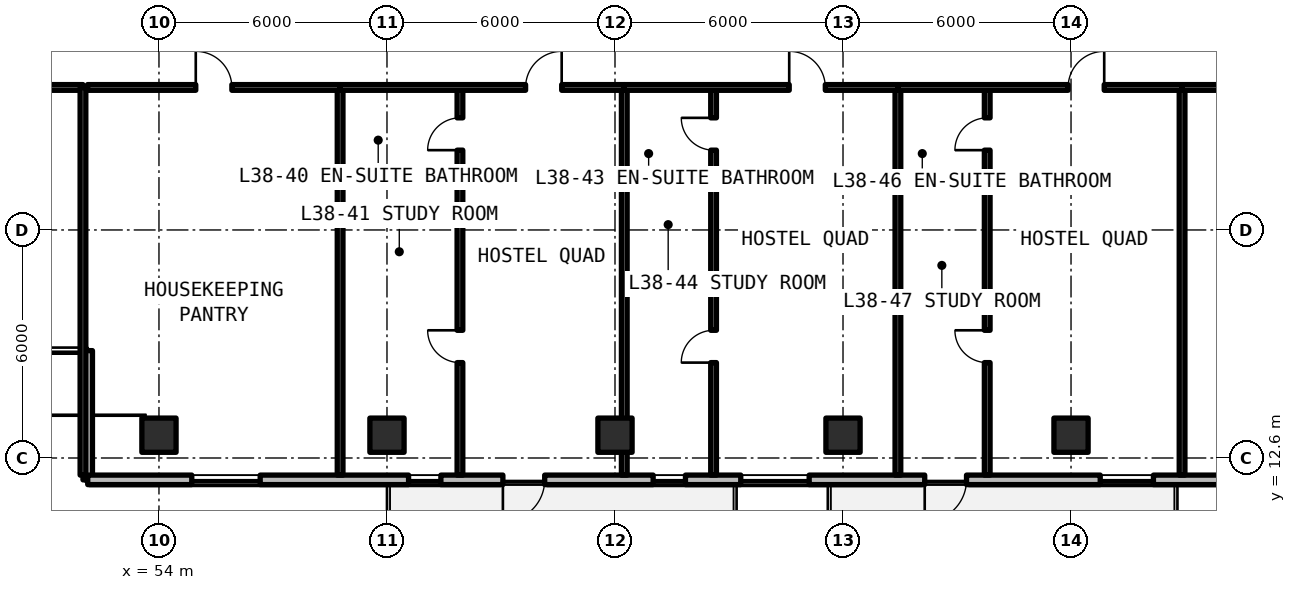
"""IFC4 building model, lengths in metres.
Left out: names, types, materials, properties, quantities, classifications, styles, units other than length and angle.
Written with IfcOpenShell. Run it as: python <this file> out.ifc"""

import sys

from ifc_helpers import new_model, si_unit, direction, frame, frame_2d, origin, origin_2d, place, context, subcontext, project, spatial, rectangle, extrude, element, fill, save


model = new_model("IFC4")
c1 = context("Model", 3, precision=1e-05, world=origin(), true_north=direction((0.0, 1.0)))
c2 = subcontext(c1, "Body", "Model", "MODEL_VIEW")
j1 = project(units=[si_unit("LENGTHUNIT", "METRE"), si_unit("PLANEANGLEUNIT", "RADIAN")], contexts=[c1])
p1 = place(None, origin())
s1 = spatial("IfcSite", under=j1, at=p1, CompositionType="ELEMENT")
p2 = place(p1, origin())
s2 = spatial("IfcBuilding", under=s1, at=p2, CompositionType="ELEMENT")
p3 = place(p2, frame((0.0, 0.0, 138.6)))
s3 = spatial("IfcBuildingStorey", under=s2, at=p3, CompositionType="ELEMENT", Elevation=138.6)
for number, where, z_axis, x_axis in (
    (1, (54.0, 13.2, 0.0), (0.0, 0.0, 1.0), (1.0, 0.0, 0.0)),
    (2, (60.0, 13.2, 0.0), (0.0, 0.0, 1.0), (1.0, 0.0, 0.0)),
    (3, (66.0, 13.2, 0.0), (0.0, 0.0, 1.0), (1.0, 0.0, 0.0)),
    (4, (72.0, 13.2, 0.0), (0.0, 0.0, 1.0), (1.0, 0.0, 0.0)),
    (5, (78.0, 13.2, 0.0), (0.0, 0.0, 1.0), (1.0, 0.0, 0.0)),
):
    element("IfcColumn", number, at=place(p3, frame(where, z_axis=z_axis, x_axis=x_axis)), inside=s3, PredefinedType="COLUMN", context=c2, shape_type="SweptSolid", body=[
        extrude(rectangle(XDim=0.9, YDim=0.9, at=origin_2d()), origin(), (0.0, 0.0, 1.0), 3.3),
    ])
p4 = place(p3, frame((52.125, 15.425, 0.0), z_axis=(0.0, 0.0, 1.0), x_axis=(0.0, -1.0, 0.0)))
e6 = element("IfcWall", 6, at=p4, inside=s3, PredefinedType="SOLIDWALL", context=c2, shape_type="SweptSolid", body=[
    extrude(rectangle(XDim=3.4, YDim=0.25, at=frame_2d((1.7, 0.0))), origin(), (0.0, 0.0, 1.0), 3.08),
])
p5 = place(p3, frame((52.125, 12.025, 0.0), z_axis=(0.0, 0.0, 1.0), x_axis=(1.0, 0.0, 0.0)))
e7 = element("IfcWall", 7, at=p5, inside=s3, PredefinedType="SOLIDWALL", context=c2, shape_type="SweptSolid", body=[
    extrude(rectangle(XDim=43.623, YDim=0.25, at=frame_2d((21.812, 0.0))), origin(), (0.0, 0.0, 1.0), 3.08),
])
p6 = place(p5, frame((10.925, 0.0, 0.0)))
e8 = element("IfcOpeningElement", 8, at=p6, cuts=e7, PredefinedType="OPENING", context=c2, shape_type="SweptSolid", body=[
    extrude(rectangle(XDim=1.1, YDim=2.15, at=frame_2d((0.55, 1.075))), frame((0.0, 0.135, 0.0), z_axis=(0.0, -1.0, 0.0), x_axis=(1.0, 0.0, 0.0)), (0.0, 0.0, 1.0), 0.27),
])
p7 = place(p5, frame((22.025, 0.0, 0.0)))
e9 = element("IfcOpeningElement", 9, at=p7, cuts=e7, PredefinedType="OPENING", context=c2, shape_type="SweptSolid", body=[
    extrude(rectangle(XDim=1.1, YDim=2.15, at=frame_2d((0.55, 1.075))), frame((0.0, 0.135, 0.0), z_axis=(0.0, -1.0, 0.0), x_axis=(1.0, 0.0, 0.0)), (0.0, 0.0, 1.0), 0.27),
])
p8 = place(p5, frame((2.738, 0.0, 0.78)))
e10 = element("IfcOpeningElement", 10, at=p8, cuts=e7, PredefinedType="OPENING", context=c2, shape_type="SweptSolid", body=[
    extrude(rectangle(XDim=1.8, YDim=1.66, at=frame_2d((0.9, 0.83))), frame((0.0, 0.135, 0.0), z_axis=(0.0, -1.0, 0.0), x_axis=(1.0, 0.0, 0.0)), (0.0, 0.0, 1.0), 0.27),
])
p9 = place(p5, frame((8.443, 0.0, 0.78)))
e11 = element("IfcOpeningElement", 11, at=p9, cuts=e7, PredefinedType="OPENING", context=c2, shape_type="SweptSolid", body=[
    extrude(rectangle(XDim=0.85, YDim=1.65, at=frame_2d((0.425, 0.825))), frame((0.0, 0.135, 0.0), z_axis=(0.0, -1.0, 0.0), x_axis=(1.0, 0.0, 0.0)), (0.0, 0.0, 1.0), 0.27),
])
p10 = place(p5, frame((14.879, 0.0, 0.78)))
e12 = element("IfcOpeningElement", 12, at=p10, cuts=e7, PredefinedType="OPENING", context=c2, shape_type="SweptSolid", body=[
    extrude(rectangle(XDim=0.85, YDim=1.65, at=frame_2d((0.425, 0.825))), frame((0.0, 0.135, 0.0), z_axis=(0.0, -1.0, 0.0), x_axis=(1.0, 0.0, 0.0)), (0.0, 0.0, 1.0), 0.27),
])
p11 = place(p5, frame((17.184, 0.0, 0.78)))
e13 = element("IfcOpeningElement", 13, at=p11, cuts=e7, PredefinedType="OPENING", context=c2, shape_type="SweptSolid", body=[
    extrude(rectangle(XDim=1.8, YDim=1.66, at=frame_2d((0.9, 0.83))), frame((0.0, 0.135, 0.0), z_axis=(0.0, -1.0, 0.0), x_axis=(1.0, 0.0, 0.0)), (0.0, 0.0, 1.0), 0.27),
])
p12 = place(p5, frame((26.643, 0.0, 0.78)))
e14 = element("IfcOpeningElement", 14, at=p12, cuts=e7, PredefinedType="OPENING", context=c2, shape_type="SweptSolid", body=[
    extrude(rectangle(XDim=1.4, YDim=1.65, at=frame_2d((0.7, 0.825))), frame((0.0, 0.135, 0.0), z_axis=(0.0, -1.0, 0.0), x_axis=(1.0, 0.0, 0.0)), (0.0, 0.0, 1.0), 0.27),
])
p13 = place(p5, frame((32.777, 0.0, 0.78)))
e15 = element("IfcOpeningElement", 15, at=p13, cuts=e7, PredefinedType="OPENING", context=c2, shape_type="SweptSolid", body=[
    extrude(rectangle(XDim=1.8, YDim=1.66, at=frame_2d((0.9, 0.83))), frame((0.0, 0.135, 0.0), z_axis=(0.0, -1.0, 0.0), x_axis=(1.0, 0.0, 0.0)), (0.0, 0.0, 1.0), 0.27),
])
p14 = place(p5, frame((38.836, 0.0, 0.78)))
e16 = element("IfcOpeningElement", 16, at=p14, cuts=e7, PredefinedType="OPENING", context=c2, shape_type="SweptSolid", body=[
    extrude(rectangle(XDim=1.8, YDim=1.66, at=frame_2d((0.9, 0.83))), frame((0.0, 0.135, 0.0), z_axis=(0.0, -1.0, 0.0), x_axis=(1.0, 0.0, 0.0)), (0.0, 0.0, 1.0), 0.27),
])
p15 = place(p3, frame((43.6, 22.35, 0.0), z_axis=(0.0, 0.0, 1.0), x_axis=(1.0, 0.0, 0.0)))
e17 = element("IfcWall", 17, at=p15, inside=s3, PredefinedType="SOLIDWALL", context=c2, shape_type="SweptSolid", body=[
    extrude(rectangle(XDim=8.4, YDim=0.15, at=frame_2d((4.2, 0.0))), origin(), (0.0, 0.0, 1.0), 2.35),
])
p16 = place(p15, frame((3.65, 0.0, 0.0)))
e18 = element("IfcOpeningElement", 18, at=p16, cuts=e17, PredefinedType="OPENING", context=c2, shape_type="SweptSolid", body=[
    extrude(rectangle(XDim=1.1, YDim=2.15, at=frame_2d((0.55, 1.075))), frame((0.0, 0.085, 0.0), z_axis=(0.0, -1.0, 0.0), x_axis=(1.0, 0.0, 0.0)), (0.0, 0.0, 1.0), 0.17),
])
for number, where, z_axis, x_axis in (
    (19, (52.0, 12.15, 0.0), (0.0, 0.0, 1.0), (0.0, 1.0, 0.0)),
    (20, (58.767, 12.15, 0.0), (0.0, 0.0, 1.0), (0.0, 1.0, 0.0)),
):
    element("IfcWall", number, at=place(p3, frame(where, z_axis=z_axis, x_axis=x_axis)), inside=s3, PredefinedType="SOLIDWALL", context=c2, shape_type="SweptSolid", body=[
        extrude(rectangle(XDim=10.2, YDim=0.15, at=frame_2d((5.1, 0.0))), origin(), (0.0, 0.0, 1.0), 2.35),
    ])
p17 = place(p3, frame((52.12, 22.35, 0.0), z_axis=(0.0, 0.0, 1.0), x_axis=(1.0, 0.0, 0.0)))
e21 = element("IfcWall", 21, at=p17, inside=s3, PredefinedType="SOLIDWALL", context=c2, shape_type="SweptSolid", body=[
    extrude(rectangle(XDim=6.646, YDim=0.15, at=frame_2d((3.323, 0.0))), origin(), (0.0, 0.0, 1.0), 2.35),
])
p18 = place(p17, frame((2.848, 0.0, 0.0)))
e22 = element("IfcOpeningElement", 22, at=p18, cuts=e21, PredefinedType="OPENING", context=c2, shape_type="SweptSolid", body=[
    extrude(rectangle(XDim=0.95, YDim=2.15, at=frame_2d((0.475, 1.075))), frame((0.0, 0.085, 0.0), z_axis=(0.0, -1.0, 0.0), x_axis=(1.0, 0.0, 0.0)), (0.0, 0.0, 1.0), 0.17),
])
p19 = place(p3, frame((66.244, 12.15, 0.0), z_axis=(0.0, 0.0, 1.0), x_axis=(0.0, 1.0, 0.0)))
e23 = element("IfcWall", 23, at=p19, inside=s3, PredefinedType="SOLIDWALL", context=c2, shape_type="SweptSolid", body=[
    extrude(rectangle(XDim=10.2, YDim=0.15, at=frame_2d((5.1, 0.0))), origin(), (0.0, 0.0, 1.0), 2.35),
])
p20 = place(p3, frame((58.767, 19.9, 0.0), z_axis=(0.0, 0.0, 1.0), x_axis=(1.0, 0.0, 0.0)))
e24 = element("IfcWall", 24, at=p20, inside=s3, PredefinedType="PARTITIONING", context=c2, shape_type="SweptSolid", body=[
    extrude(rectangle(XDim=3.153, YDim=0.15, at=frame_2d((1.577, 0.0))), origin(), (0.0, 0.0, 1.0), 2.35),
])
p21 = place(p3, frame((61.92, 12.15, 0.0), z_axis=(0.0, 0.0, 1.0), x_axis=(0.0, 1.0, 0.0)))
e25 = element("IfcWall", 25, at=p21, inside=s3, PredefinedType="PARTITIONING", context=c2, shape_type="SweptSolid", body=[
    extrude(rectangle(XDim=10.2, YDim=0.15, at=frame_2d((5.1, 0.0))), origin(), (0.0, 0.0, 1.0), 2.35),
])
p22 = place(p21, frame((2.96, 0.0, 0.0)))
e26 = element("IfcOpeningElement", 26, at=p22, cuts=e25, PredefinedType="OPENING", context=c2, shape_type="SweptSolid", body=[
    extrude(rectangle(XDim=0.85, YDim=2.1, at=frame_2d((0.425, 1.05))), frame((0.0, 0.085, 0.0), z_axis=(0.0, -1.0, 0.0), x_axis=(1.0, 0.0, 0.0)), (0.0, 0.0, 1.0), 0.17),
])
p23 = place(p21, frame((8.55, 0.0, 0.0)))
e27 = element("IfcOpeningElement", 27, at=p23, cuts=e25, PredefinedType="OPENING", context=c2, shape_type="SweptSolid", body=[
    extrude(rectangle(XDim=0.85, YDim=2.1, at=frame_2d((0.425, 1.05))), frame((0.0, 0.085, 0.0), z_axis=(0.0, -1.0, 0.0), x_axis=(1.0, 0.0, 0.0)), (0.0, 0.0, 1.0), 0.17),
])
p24 = place(p3, frame((58.767, 22.35, 0.0), z_axis=(0.0, 0.0, 1.0), x_axis=(1.0, 0.0, 0.0)))
e28 = element("IfcWall", 28, at=p24, inside=s3, PredefinedType="SOLIDWALL", context=c2, shape_type="SweptSolid", body=[
    extrude(rectangle(XDim=7.478, YDim=0.15, at=frame_2d((3.739, 0.0))), origin(), (0.0, 0.0, 1.0), 2.35),
])
p25 = place(p24, frame((4.881, 0.0, 0.0)))
e29 = element("IfcOpeningElement", 29, at=p25, cuts=e28, PredefinedType="OPENING", context=c2, shape_type="SweptSolid", body=[
    extrude(rectangle(XDim=0.95, YDim=2.15, at=frame_2d((0.475, 1.075))), frame((0.0, 0.085, 0.0), z_axis=(0.0, -1.0, 0.0), x_axis=(1.0, 0.0, 0.0)), (0.0, 0.0, 1.0), 0.17),
])
p26 = place(p3, frame((73.445, 12.15, 0.0), z_axis=(0.0, 0.0, 1.0), x_axis=(0.0, 1.0, 0.0)))
e30 = element("IfcWall", 30, at=p26, inside=s3, PredefinedType="SOLIDWALL", context=c2, shape_type="SweptSolid", body=[
    extrude(rectangle(XDim=10.2, YDim=0.15, at=frame_2d((5.1, 0.0))), origin(), (0.0, 0.0, 1.0), 2.35),
])
p27 = place(p3, frame((66.244, 19.9, 0.0), z_axis=(0.0, 0.0, 1.0), x_axis=(1.0, 0.0, 0.0)))
e31 = element("IfcWall", 31, at=p27, inside=s3, PredefinedType="PARTITIONING", context=c2, shape_type="SweptSolid", body=[
    extrude(rectangle(XDim=2.35, YDim=0.15, at=frame_2d((1.175, 0.0))), origin(), (0.0, 0.0, 1.0), 2.35),
])
p28 = place(p3, frame((68.594, 12.15, 0.0), z_axis=(0.0, 0.0, 1.0), x_axis=(0.0, 1.0, 0.0)))
e32 = element("IfcWall", 32, at=p28, inside=s3, PredefinedType="PARTITIONING", context=c2, shape_type="SweptSolid", body=[
    extrude(rectangle(XDim=10.2, YDim=0.15, at=frame_2d((5.1, 0.0))), origin(), (0.0, 0.0, 1.0), 2.35),
])
p29 = place(p28, frame((2.96, 0.0, 0.0)))
e33 = element("IfcOpeningElement", 33, at=p29, cuts=e32, PredefinedType="OPENING", context=c2, shape_type="SweptSolid", body=[
    extrude(rectangle(XDim=0.85, YDim=2.1, at=frame_2d((0.425, 1.05))), frame((0.0, 0.085, 0.0), z_axis=(0.0, -1.0, 0.0), x_axis=(1.0, 0.0, 0.0)), (0.0, 0.0, 1.0), 0.17),
])
p30 = place(p28, frame((8.55, 0.0, 0.0)))
e34 = element("IfcOpeningElement", 34, at=p30, cuts=e32, PredefinedType="OPENING", context=c2, shape_type="SweptSolid", body=[
    extrude(rectangle(XDim=0.85, YDim=2.1, at=frame_2d((0.425, 1.05))), frame((0.0, 0.085, 0.0), z_axis=(0.0, -1.0, 0.0), x_axis=(1.0, 0.0, 0.0)), (0.0, 0.0, 1.0), 0.17),
])
p31 = place(p3, frame((66.244, 22.35, 0.0), z_axis=(0.0, 0.0, 1.0), x_axis=(1.0, 0.0, 0.0)))
e35 = element("IfcWall", 35, at=p31, inside=s3, PredefinedType="SOLIDWALL", context=c2, shape_type="SweptSolid", body=[
    extrude(rectangle(XDim=7.2, YDim=0.15, at=frame_2d((3.6, 0.0))), origin(), (0.0, 0.0, 1.0), 2.35),
])
p32 = place(p31, frame((4.34, 0.0, 0.0)))
e36 = element("IfcOpeningElement", 36, at=p32, cuts=e35, PredefinedType="OPENING", context=c2, shape_type="SweptSolid", body=[
    extrude(rectangle(XDim=0.95, YDim=2.15, at=frame_2d((0.475, 1.075))), frame((0.0, 0.085, 0.0), z_axis=(0.0, -1.0, 0.0), x_axis=(1.0, 0.0, 0.0)), (0.0, 0.0, 1.0), 0.17),
])
p33 = place(p3, frame((80.922, 12.15, 0.0), z_axis=(0.0, 0.0, 1.0), x_axis=(0.0, 1.0, 0.0)))
e37 = element("IfcWall", 37, at=p33, inside=s3, PredefinedType="SOLIDWALL", context=c2, shape_type="SweptSolid", body=[
    extrude(rectangle(XDim=10.2, YDim=0.15, at=frame_2d((5.1, 0.0))), origin(), (0.0, 0.0, 1.0), 2.35),
])
p34 = place(p3, frame((73.445, 19.9, 0.0), z_axis=(0.0, 0.0, 1.0), x_axis=(1.0, 0.0, 0.0)))
e38 = element("IfcWall", 38, at=p34, inside=s3, PredefinedType="PARTITIONING", context=c2, shape_type="SweptSolid", body=[
    extrude(rectangle(XDim=2.35, YDim=0.15, at=frame_2d((1.175, 0.0))), origin(), (0.0, 0.0, 1.0), 2.35),
])
p35 = place(p3, frame((75.795, 12.15, 0.0), z_axis=(0.0, 0.0, 1.0), x_axis=(0.0, 1.0, 0.0)))
e39 = element("IfcWall", 39, at=p35, inside=s3, PredefinedType="PARTITIONING", context=c2, shape_type="SweptSolid", body=[
    extrude(rectangle(XDim=10.2, YDim=0.15, at=frame_2d((5.1, 0.0))), origin(), (0.0, 0.0, 1.0), 2.35),
])
p36 = place(p35, frame((2.96, 0.0, 0.0)))
e40 = element("IfcOpeningElement", 40, at=p36, cuts=e39, PredefinedType="OPENING", context=c2, shape_type="SweptSolid", body=[
    extrude(rectangle(XDim=0.85, YDim=2.1, at=frame_2d((0.425, 1.05))), frame((0.0, 0.085, 0.0), z_axis=(0.0, -1.0, 0.0), x_axis=(1.0, 0.0, 0.0)), (0.0, 0.0, 1.0), 0.17),
])
p37 = place(p35, frame((8.55, 0.0, 0.0)))
e41 = element("IfcOpeningElement", 41, at=p37, cuts=e39, PredefinedType="OPENING", context=c2, shape_type="SweptSolid", body=[
    extrude(rectangle(XDim=0.85, YDim=2.1, at=frame_2d((0.425, 1.05))), frame((0.0, 0.085, 0.0), z_axis=(0.0, -1.0, 0.0), x_axis=(1.0, 0.0, 0.0)), (0.0, 0.0, 1.0), 0.17),
])
p38 = place(p3, frame((73.445, 22.35, 0.0), z_axis=(0.0, 0.0, 1.0), x_axis=(1.0, 0.0, 0.0)))
e42 = element("IfcWall", 42, at=p38, inside=s3, PredefinedType="SOLIDWALL", context=c2, shape_type="SweptSolid", body=[
    extrude(rectangle(XDim=7.478, YDim=0.15, at=frame_2d((3.739, 0.0))), origin(), (0.0, 0.0, 1.0), 2.35),
])
p39 = place(p38, frame((4.479, 0.0, 0.0)))
e43 = element("IfcOpeningElement", 43, at=p39, cuts=e42, PredefinedType="OPENING", context=c2, shape_type="SweptSolid", body=[
    extrude(rectangle(XDim=0.95, YDim=2.15, at=frame_2d((0.475, 1.075))), frame((0.0, 0.085, 0.0), z_axis=(0.0, -1.0, 0.0), x_axis=(1.0, 0.0, 0.0)), (0.0, 0.0, 1.0), 0.17),
])
p40 = place(p3, frame((80.922, 22.35, 0.0), z_axis=(0.0, 0.0, 1.0), x_axis=(1.0, 0.0, 0.0)))
e44 = element("IfcWall", 44, at=p40, inside=s3, PredefinedType="SOLIDWALL", context=c2, shape_type="SweptSolid", body=[
    extrude(rectangle(XDim=7.2, YDim=0.15, at=frame_2d((3.6, 0.0))), origin(), (0.0, 0.0, 1.0), 2.35),
])
p41 = place(p40, frame((3.125, 0.0, 0.0)))
e45 = element("IfcOpeningElement", 45, at=p41, cuts=e44, PredefinedType="OPENING", context=c2, shape_type="SweptSolid", body=[
    extrude(rectangle(XDim=0.95, YDim=2.15, at=frame_2d((0.475, 1.075))), frame((0.0, 0.085, 0.0), z_axis=(0.0, -1.0, 0.0), x_axis=(1.0, 0.0, 0.0)), (0.0, 0.0, 1.0), 0.17),
])
p42 = place(p6, frame((1.1, 0.0, 0.0), z_axis=(0.0, 0.0, 1.0), x_axis=(-1.0, 0.0, 0.0)))
e46 = element("IfcDoor", 46, at=p42, inside=s3, OperationType="SINGLE_SWING_LEFT", PredefinedType="DOOR", context=c2, shape_type="SweptSolid", body=[
    extrude(rectangle(XDim=1.1, YDim=2.15, at=frame_2d((0.55, 1.075))), frame((0.0, 0.025, 0.0), z_axis=(0.0, -1.0, 0.0), x_axis=(1.0, 0.0, 0.0)), (0.0, 0.0, 1.0), 0.05),
])
fill(e8, e46)
p43 = place(p7, frame((1.1, 0.0, 0.0), z_axis=(0.0, 0.0, 1.0), x_axis=(-1.0, 0.0, 0.0)))
e47 = element("IfcDoor", 47, at=p43, inside=s3, OperationType="SINGLE_SWING_RIGHT", PredefinedType="DOOR", context=c2, shape_type="SweptSolid", body=[
    extrude(rectangle(XDim=1.1, YDim=2.15, at=frame_2d((0.55, 1.075))), frame((0.0, 0.025, 0.0), z_axis=(0.0, -1.0, 0.0), x_axis=(1.0, 0.0, 0.0)), (0.0, 0.0, 1.0), 0.05),
])
fill(e9, e47)
p44 = place(p8, origin())
e48 = element("IfcWindow", 48, at=p44, inside=s3, PartitioningType="SINGLE_PANEL", PredefinedType="WINDOW", context=c2, shape_type="SweptSolid", body=[
    extrude(rectangle(XDim=1.8, YDim=1.66, at=frame_2d((0.9, 0.83))), frame((0.0, 0.03, 0.0), z_axis=(0.0, -1.0, 0.0), x_axis=(1.0, 0.0, 0.0)), (0.0, 0.0, 1.0), 0.06),
])
fill(e10, e48)
p45 = place(p9, origin())
e49 = element("IfcWindow", 49, at=p45, inside=s3, PartitioningType="SINGLE_PANEL", PredefinedType="WINDOW", context=c2, shape_type="SweptSolid", body=[
    extrude(rectangle(XDim=0.85, YDim=1.65, at=frame_2d((0.425, 0.825))), frame((0.0, 0.03, 0.0), z_axis=(0.0, -1.0, 0.0), x_axis=(1.0, 0.0, 0.0)), (0.0, 0.0, 1.0), 0.06),
])
fill(e11, e49)
p46 = place(p10, origin())
e50 = element("IfcWindow", 50, at=p46, inside=s3, PartitioningType="SINGLE_PANEL", PredefinedType="WINDOW", context=c2, shape_type="SweptSolid", body=[
    extrude(rectangle(XDim=0.85, YDim=1.65, at=frame_2d((0.425, 0.825))), frame((0.0, 0.03, 0.0), z_axis=(0.0, -1.0, 0.0), x_axis=(1.0, 0.0, 0.0)), (0.0, 0.0, 1.0), 0.06),
])
fill(e12, e50)
p47 = place(p11, origin())
e51 = element("IfcWindow", 51, at=p47, inside=s3, PartitioningType="SINGLE_PANEL", PredefinedType="WINDOW", context=c2, shape_type="SweptSolid", body=[
    extrude(rectangle(XDim=1.8, YDim=1.66, at=frame_2d((0.9, 0.83))), frame((0.0, 0.03, 0.0), z_axis=(0.0, -1.0, 0.0), x_axis=(1.0, 0.0, 0.0)), (0.0, 0.0, 1.0), 0.06),
])
fill(e13, e51)
p48 = place(p12, origin())
e52 = element("IfcWindow", 52, at=p48, inside=s3, PartitioningType="SINGLE_PANEL", PredefinedType="WINDOW", context=c2, shape_type="SweptSolid", body=[
    extrude(rectangle(XDim=1.4, YDim=1.65, at=frame_2d((0.7, 0.825))), frame((0.0, 0.03, 0.0), z_axis=(0.0, -1.0, 0.0), x_axis=(1.0, 0.0, 0.0)), (0.0, 0.0, 1.0), 0.06),
])
fill(e14, e52)
p49 = place(p18, origin())
e53 = element("IfcDoor", 53, at=p49, inside=s3, OperationType="SINGLE_SWING_LEFT", PredefinedType="DOOR", context=c2, shape_type="SweptSolid", body=[
    extrude(rectangle(XDim=0.95, YDim=2.15, at=frame_2d((0.475, 1.075))), frame((0.0, 0.025, 0.0), z_axis=(0.0, -1.0, 0.0), x_axis=(1.0, 0.0, 0.0)), (0.0, 0.0, 1.0), 0.05),
])
fill(e22, e53)
p50 = place(p22, origin())
e54 = element("IfcDoor", 54, at=p50, inside=s3, OperationType="SINGLE_SWING_RIGHT", PredefinedType="DOOR", context=c2, shape_type="SweptSolid", body=[
    extrude(rectangle(XDim=0.85, YDim=2.1, at=frame_2d((0.425, 1.05))), frame((0.0, 0.025, 0.0), z_axis=(0.0, -1.0, 0.0), x_axis=(1.0, 0.0, 0.0)), (0.0, 0.0, 1.0), 0.05),
])
fill(e26, e54)
p51 = place(p23, origin())
e55 = element("IfcDoor", 55, at=p51, inside=s3, OperationType="SINGLE_SWING_LEFT", PredefinedType="DOOR", context=c2, shape_type="SweptSolid", body=[
    extrude(rectangle(XDim=0.85, YDim=2.1, at=frame_2d((0.425, 1.05))), frame((0.0, 0.025, 0.0), z_axis=(0.0, -1.0, 0.0), x_axis=(1.0, 0.0, 0.0)), (0.0, 0.0, 1.0), 0.05),
])
fill(e27, e55)
p52 = place(p25, origin())
e56 = element("IfcDoor", 56, at=p52, inside=s3, OperationType="SINGLE_SWING_RIGHT", PredefinedType="DOOR", context=c2, shape_type="SweptSolid", body=[
    extrude(rectangle(XDim=0.95, YDim=2.15, at=frame_2d((0.475, 1.075))), frame((0.0, 0.025, 0.0), z_axis=(0.0, -1.0, 0.0), x_axis=(1.0, 0.0, 0.0)), (0.0, 0.0, 1.0), 0.05),
])
fill(e29, e56)
p53 = place(p29, origin())
e57 = element("IfcDoor", 57, at=p53, inside=s3, OperationType="SINGLE_SWING_LEFT", PredefinedType="DOOR", context=c2, shape_type="SweptSolid", body=[
    extrude(rectangle(XDim=0.85, YDim=2.1, at=frame_2d((0.425, 1.05))), frame((0.0, 0.025, 0.0), z_axis=(0.0, -1.0, 0.0), x_axis=(1.0, 0.0, 0.0)), (0.0, 0.0, 1.0), 0.05),
])
fill(e33, e57)
p54 = place(p30, origin())
e58 = element("IfcDoor", 58, at=p54, inside=s3, OperationType="SINGLE_SWING_RIGHT", PredefinedType="DOOR", context=c2, shape_type="SweptSolid", body=[
    extrude(rectangle(XDim=0.85, YDim=2.1, at=frame_2d((0.425, 1.05))), frame((0.0, 0.025, 0.0), z_axis=(0.0, -1.0, 0.0), x_axis=(1.0, 0.0, 0.0)), (0.0, 0.0, 1.0), 0.05),
])
fill(e34, e58)
p55 = place(p32, origin())
e59 = element("IfcDoor", 59, at=p55, inside=s3, OperationType="SINGLE_SWING_LEFT", PredefinedType="DOOR", context=c2, shape_type="SweptSolid", body=[
    extrude(rectangle(XDim=0.95, YDim=2.15, at=frame_2d((0.475, 1.075))), frame((0.0, 0.025, 0.0), z_axis=(0.0, -1.0, 0.0), x_axis=(1.0, 0.0, 0.0)), (0.0, 0.0, 1.0), 0.05),
])
fill(e36, e59)
p56 = place(p36, origin())
e60 = element("IfcDoor", 60, at=p56, inside=s3, OperationType="SINGLE_SWING_RIGHT", PredefinedType="DOOR", context=c2, shape_type="SweptSolid", body=[
    extrude(rectangle(XDim=0.85, YDim=2.1, at=frame_2d((0.425, 1.05))), frame((0.0, 0.025, 0.0), z_axis=(0.0, -1.0, 0.0), x_axis=(1.0, 0.0, 0.0)), (0.0, 0.0, 1.0), 0.05),
])
fill(e40, e60)
p57 = place(p37, origin())
e61 = element("IfcDoor", 61, at=p57, inside=s3, OperationType="SINGLE_SWING_LEFT", PredefinedType="DOOR", context=c2, shape_type="SweptSolid", body=[
    extrude(rectangle(XDim=0.85, YDim=2.1, at=frame_2d((0.425, 1.05))), frame((0.0, 0.025, 0.0), z_axis=(0.0, -1.0, 0.0), x_axis=(1.0, 0.0, 0.0)), (0.0, 0.0, 1.0), 0.05),
])
fill(e41, e61)
p58 = place(p39, origin())
e62 = element("IfcDoor", 62, at=p58, inside=s3, OperationType="SINGLE_SWING_RIGHT", PredefinedType="DOOR", context=c2, shape_type="SweptSolid", body=[
    extrude(rectangle(XDim=0.95, YDim=2.15, at=frame_2d((0.475, 1.075))), frame((0.0, 0.025, 0.0), z_axis=(0.0, -1.0, 0.0), x_axis=(1.0, 0.0, 0.0)), (0.0, 0.0, 1.0), 0.05),
])
fill(e43, e62)
save(model, sys.argv[1])
